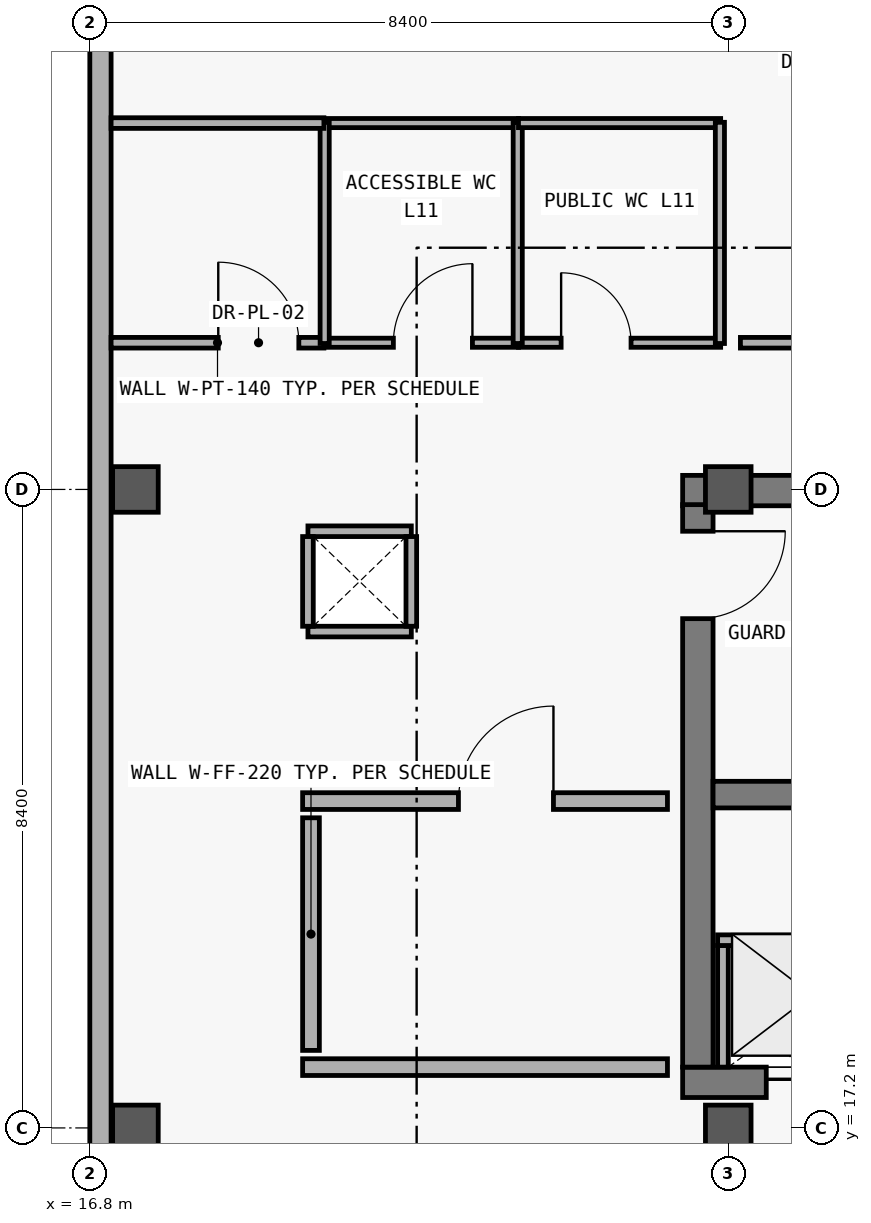
"""IFC4 building model, lengths in metres.
Left out: names, types, materials, properties, quantities, classifications, styles, units other than length and angle.
Written with IfcOpenShell. Run it as: python <this file> out.ifc"""

import sys

from ifc_helpers import new_model, si_unit, direction, frame, frame_2d, origin, origin_2d, place, context, subcontext, project, spatial, rectangle, extrude, element, fill, save


model = new_model("IFC4")
c1 = context("Model", 3, precision=1e-05, world=origin(), true_north=direction((0.0, 1.0)))
c2 = subcontext(c1, "Body", "Model", "MODEL_VIEW")
j1 = project(units=[si_unit("LENGTHUNIT", "METRE"), si_unit("PLANEANGLEUNIT", "RADIAN")], contexts=[c1])
p1 = place(None, origin())
s1 = spatial("IfcSite", under=j1, at=p1, CompositionType="ELEMENT")
p2 = place(p1, origin())
s2 = spatial("IfcBuilding", under=s1, at=p2, CompositionType="ELEMENT")
p3 = place(p2, frame((0.0, 0.0, 44.4)))
s3 = spatial("IfcBuildingStorey", under=s2, at=p3, CompositionType="ELEMENT", Elevation=44.4)
for number, where, z_axis, x_axis in (
    (1, (17.4, 17.2, 0.0), (0.0, 0.0, 1.0), (1.0, 0.0, 0.0)),
    (2, (17.4, 25.6, 0.0), (0.0, 0.0, 1.0), (1.0, 0.0, 0.0)),
    (3, (25.2, 17.2, 0.0), (0.0, 0.0, 1.0), (1.0, 0.0, 0.0)),
    (4, (25.2, 25.6, 0.0), (0.0, 0.0, 1.0), (1.0, 0.0, 0.0)),
):
    element("IfcColumn", number, at=place(p3, frame(where, z_axis=z_axis, x_axis=x_axis)), inside=s3, PredefinedType="COLUMN", context=c2, shape_type="SweptSolid", body=[
        extrude(rectangle(XDim=0.6, YDim=0.6, at=origin_2d()), origin(), (0.0, 0.0, 1.0), 4.2),
    ])
p4 = place(p3, frame((16.94, 8.8, 0.0), z_axis=(0.0, 0.0, 1.0), x_axis=(0.0, 1.0, 0.0)))
e5 = element("IfcWall", 5, at=p4, inside=s3, PredefinedType="SOLIDWALL", context=c2, shape_type="SweptSolid", body=[
    extrude(rectangle(XDim=25.2, YDim=0.28, at=frame_2d((12.6, 0.0))), origin(), (0.0, 0.0, 1.0), 3.96),
])
p5 = place(p4, frame((1.7, 0.0, 0.95)))
e6 = element("IfcOpeningElement", 6, at=p5, cuts=e5, PredefinedType="OPENING", context=c2, shape_type="SweptSolid", body=[
    extrude(rectangle(XDim=1.6, YDim=1.6, at=frame_2d((0.8, 0.8))), frame((0.0, 0.15, 0.0), z_axis=(0.0, -1.0, 0.0), x_axis=(1.0, 0.0, 0.0)), (0.0, 0.0, 1.0), 0.3),
])
p6 = place(p3, frame((24.6, 17.8, 0.0), z_axis=(0.0, 0.0, 1.0), x_axis=(1.0, 0.0, 0.0)))
e7 = element("IfcWall", 7, at=p6, inside=s3, PredefinedType="SHEAR", context=c2, shape_type="SweptSolid", body=[
    extrude(rectangle(XDim=9.2, YDim=0.4, at=frame_2d((4.6, 0.0))), origin(), (0.0, 0.0, 1.0), 3.96),
])
p7 = place(p6, frame((1.1, 0.0, 0.0)))
e8 = element("IfcOpeningElement", 8, at=p7, cuts=e7, PredefinedType="OPENING", context=c2, shape_type="SweptSolid", body=[
    extrude(rectangle(XDim=1.2, YDim=2.2, at=frame_2d((0.6, 1.1))), frame((0.0, 0.21, 0.0), z_axis=(0.0, -1.0, 0.0), x_axis=(1.0, 0.0, 0.0)), (0.0, 0.0, 1.0), 0.42),
])
p8 = place(p6, frame((3.5, 0.0, 0.0)))
e9 = element("IfcOpeningElement", 9, at=p8, cuts=e7, PredefinedType="OPENING", context=c2, shape_type="SweptSolid", body=[
    extrude(rectangle(XDim=1.1, YDim=2.2, at=frame_2d((0.55, 1.1))), frame((0.0, 0.21, 0.0), z_axis=(0.0, -1.0, 0.0), x_axis=(1.0, 0.0, 0.0)), (0.0, 0.0, 1.0), 0.42),
])
p9 = place(p6, frame((5.9, 0.0, 0.0)))
e10 = element("IfcOpeningElement", 10, at=p9, cuts=e7, PredefinedType="OPENING", context=c2, shape_type="SweptSolid", body=[
    extrude(rectangle(XDim=1.1, YDim=2.2, at=frame_2d((0.55, 1.1))), frame((0.0, 0.21, 0.0), z_axis=(0.0, -1.0, 0.0), x_axis=(1.0, 0.0, 0.0)), (0.0, 0.0, 1.0), 0.42),
])
p10 = place(p3, frame((33.8, 25.585, 0.0), z_axis=(0.0, 0.0, 1.0), x_axis=(-1.0, 0.0, 0.0)))
e11 = element("IfcWall", 11, at=p10, inside=s3, PredefinedType="SHEAR", context=c2, shape_type="SweptSolid", body=[
    extrude(rectangle(XDim=9.2, YDim=0.4, at=frame_2d((4.6, 0.0))), origin(), (0.0, 0.0, 1.0), 3.96),
])
p11 = place(p3, frame((24.8, 25.4, 0.0), z_axis=(0.0, 0.0, 1.0), x_axis=(0.0, -1.0, 0.0)))
e12 = element("IfcWall", 12, at=p11, inside=s3, PredefinedType="SHEAR", context=c2, shape_type="SweptSolid", body=[
    extrude(rectangle(XDim=7.4, YDim=0.4, at=frame_2d((3.7, 0.0))), origin(), (0.0, 0.0, 1.0), 3.96),
])
p12 = place(p11, frame((0.35, 0.0, 0.0)))
e13 = element("IfcOpeningElement", 13, at=p12, cuts=e12, PredefinedType="OPENING", context=c2, shape_type="SweptSolid", body=[
    extrude(rectangle(XDim=1.15, YDim=2.2, at=frame_2d((0.575, 1.1))), frame((0.0, 0.21, 0.0), z_axis=(0.0, -1.0, 0.0), x_axis=(1.0, 0.0, 0.0)), (0.0, 0.0, 1.0), 0.42),
])
p13 = place(p3, frame((25.0, 21.585, 0.0), z_axis=(0.0, 0.0, 1.0), x_axis=(1.0, 0.0, 0.0)))
e14 = element("IfcWall", 14, at=p13, inside=s3, PredefinedType="SHEAR", context=c2, shape_type="SweptSolid", body=[
    extrude(rectangle(XDim=8.4, YDim=0.35, at=frame_2d((4.2, 0.0))), origin(), (0.0, 0.0, 1.0), 3.96),
])
p14 = place(p3, frame((25.13, 18.0, 0.0), z_axis=(0.0, 0.0, 1.0), x_axis=(0.0, 1.0, 0.0)))
e15 = element("IfcWall", 15, at=p14, inside=s3, PredefinedType="PARTITIONING", context=c2, shape_type="SweptSolid", body=[
    extrude(rectangle(XDim=1.6, YDim=0.14, at=frame_2d((0.8, 0.0))), origin(), (0.0, 0.0, 1.0), 3.11),
])
p15 = place(p3, frame((25.06, 19.67, 0.0), z_axis=(0.0, 0.0, 1.0), x_axis=(1.0, 0.0, 0.0)))
e16 = element("IfcWall", 16, at=p15, inside=s3, PredefinedType="PARTITIONING", context=c2, shape_type="SweptSolid", body=[
    extrude(rectangle(XDim=7.18, YDim=0.14, at=frame_2d((3.59, 0.0))), origin(), (0.0, 0.0, 1.0), 3.11),
])
p16 = place(p3, frame((19.6, 18.0, 0.0), z_axis=(0.0, 0.0, 1.0), x_axis=(1.0, 0.0, 0.0)))
e17 = element("IfcWall", 17, at=p16, inside=s3, PredefinedType="SOLIDWALL", context=c2, shape_type="SweptSolid", body=[
    extrude(rectangle(XDim=4.8, YDim=0.22, at=frame_2d((2.4, 0.0))), origin(), (0.0, 0.0, 1.0), 3.11),
])
p17 = place(p3, frame((19.6, 21.5, 0.0), z_axis=(0.0, 0.0, 1.0), x_axis=(1.0, 0.0, 0.0)))
e18 = element("IfcWall", 18, at=p17, inside=s3, PredefinedType="SOLIDWALL", context=c2, shape_type="SweptSolid", body=[
    extrude(rectangle(XDim=4.8, YDim=0.22, at=frame_2d((2.4, 0.0))), origin(), (0.0, 0.0, 1.0), 3.11),
])
p18 = place(p17, frame((2.05, 0.0, 0.0)))
e19 = element("IfcOpeningElement", 19, at=p18, cuts=e18, PredefinedType="OPENING", context=c2, shape_type="SweptSolid", body=[
    extrude(rectangle(XDim=1.25, YDim=2.2, at=frame_2d((0.625, 1.1))), frame((0.0, 0.12, 0.0), z_axis=(0.0, -1.0, 0.0), x_axis=(1.0, 0.0, 0.0)), (0.0, 0.0, 1.0), 0.24),
])
p19 = place(p3, frame((19.71, 18.22, 0.0), z_axis=(0.0, 0.0, 1.0), x_axis=(0.0, 1.0, 0.0)))
e20 = element("IfcWall", 20, at=p19, inside=s3, PredefinedType="SOLIDWALL", context=c2, shape_type="SweptSolid", body=[
    extrude(rectangle(XDim=3.06, YDim=0.22, at=frame_2d((1.53, 0.0))), origin(), (0.0, 0.0, 1.0), 3.11),
])
p20 = place(p3, frame((19.88, 27.53, 0.0), z_axis=(0.0, 0.0, 1.0), x_axis=(1.0, 0.0, 0.0)))
e21 = element("IfcWall", 21, at=p20, inside=s3, PredefinedType="PARTITIONING", context=c2, shape_type="SweptSolid", body=[
    extrude(rectangle(XDim=2.56, YDim=0.12, at=frame_2d((1.28, 0.0))), origin(), (0.0, 0.0, 1.0), 3.06),
])
p21 = place(p20, frame((0.914, 0.0, 0.0)))
e22 = element("IfcOpeningElement", 22, at=p21, cuts=e21, PredefinedType="OPENING", context=c2, shape_type="SweptSolid", body=[
    extrude(rectangle(XDim=1.04, YDim=2.15, at=frame_2d((0.52, 1.075))), frame((0.0, 0.07, 0.0), z_axis=(0.0, -1.0, 0.0), x_axis=(1.0, 0.0, 0.0)), (0.0, 0.0, 1.0), 0.14),
])
p22 = place(p3, frame((22.44, 27.53, 0.0), z_axis=(0.0, 0.0, 1.0), x_axis=(1.0, 0.0, 0.0)))
e23 = element("IfcWall", 23, at=p22, inside=s3, PredefinedType="PARTITIONING", context=c2, shape_type="SweptSolid", body=[
    extrude(rectangle(XDim=2.66, YDim=0.12, at=frame_2d((1.33, 0.0))), origin(), (0.0, 0.0, 1.0), 3.06),
])
p23 = place(p22, frame((0.561, 0.0, 0.0)))
e24 = element("IfcOpeningElement", 24, at=p23, cuts=e23, PredefinedType="OPENING", context=c2, shape_type="SweptSolid", body=[
    extrude(rectangle(XDim=0.92, YDim=2.15, at=frame_2d((0.46, 1.075))), frame((0.0, 0.07, 0.0), z_axis=(0.0, -1.0, 0.0), x_axis=(1.0, 0.0, 0.0)), (0.0, 0.0, 1.0), 0.14),
])
p24 = place(p3, frame((17.08, 27.53, 0.0), z_axis=(0.0, 0.0, 1.0), x_axis=(1.0, 0.0, 0.0)))
e25 = element("IfcWall", 25, at=p24, inside=s3, PredefinedType="PARTITIONING", context=c2, shape_type="SweptSolid", body=[
    extrude(rectangle(XDim=2.8, YDim=0.14, at=frame_2d((1.4, 0.0))), origin(), (0.0, 0.0, 1.0), 3.06),
])
p25 = place(p24, frame((1.41, 0.0, 0.0)))
e26 = element("IfcOpeningElement", 26, at=p25, cuts=e25, PredefinedType="OPENING", context=c2, shape_type="SweptSolid", body=[
    extrude(rectangle(XDim=1.06, YDim=2.2, at=frame_2d((0.53, 1.1))), frame((0.0, 0.08, 0.0), z_axis=(0.0, -1.0, 0.0), x_axis=(1.0, 0.0, 0.0)), (0.0, 0.0, 1.0), 0.16),
])
p26 = place(p3, frame((25.36, 27.53, 0.0), z_axis=(0.0, 0.0, 1.0), x_axis=(1.0, 0.0, 0.0)))
e27 = element("IfcWall", 27, at=p26, inside=s3, PredefinedType="PARTITIONING", context=c2, shape_type="SweptSolid", body=[
    extrude(rectangle(XDim=3.71, YDim=0.14, at=frame_2d((1.855, 0.0))), origin(), (0.0, 0.0, 1.0), 3.06),
])
p27 = place(p26, frame((1.063, 0.0, 0.0)))
e28 = element("IfcOpeningElement", 28, at=p27, cuts=e27, PredefinedType="OPENING", context=c2, shape_type="SweptSolid", body=[
    extrude(rectangle(XDim=1.08, YDim=2.25, at=frame_2d((0.54, 1.125))), frame((0.0, 0.08, 0.0), z_axis=(0.0, -1.0, 0.0), x_axis=(1.0, 0.0, 0.0)), (0.0, 0.0, 1.0), 0.16),
])
p28 = place(p3, frame((19.88, 30.42, 0.0), z_axis=(0.0, 0.0, 1.0), x_axis=(1.0, 0.0, 0.0)))
e29 = element("IfcWall", 29, at=p28, inside=s3, PredefinedType="PARTITIONING", context=c2, shape_type="SweptSolid", body=[
    extrude(rectangle(XDim=2.56, YDim=0.12, at=frame_2d((1.28, 0.0))), origin(), (0.0, 0.0, 1.0), 3.06),
])
for number, where, z_axis, x_axis in (
    (30, (19.89, 27.52, 0.0), (0.0, 0.0, 1.0), (0.0, 1.0, 0.0)),
    (31, (22.43, 27.52, 0.0), (0.0, 0.0, 1.0), (0.0, 1.0, 0.0)),
):
    element("IfcWall", number, at=place(p3, frame(where, z_axis=z_axis, x_axis=x_axis)), inside=s3, PredefinedType="PARTITIONING", context=c2, shape_type="SweptSolid", body=[
        extrude(rectangle(XDim=2.91, YDim=0.12, at=frame_2d((1.455, 0.0))), origin(), (0.0, 0.0, 1.0), 3.06),
    ])
p29 = place(p3, frame((22.44, 30.42, 0.0), z_axis=(0.0, 0.0, 1.0), x_axis=(1.0, 0.0, 0.0)))
e32 = element("IfcWall", 32, at=p29, inside=s3, PredefinedType="PARTITIONING", context=c2, shape_type="SweptSolid", body=[
    extrude(rectangle(XDim=2.66, YDim=0.12, at=frame_2d((1.33, 0.0))), origin(), (0.0, 0.0, 1.0), 3.06),
])
p30 = place(p3, frame((25.09, 27.52, 0.0), z_axis=(0.0, 0.0, 1.0), x_axis=(0.0, 1.0, 0.0)))
e33 = element("IfcWall", 33, at=p30, inside=s3, PredefinedType="PARTITIONING", context=c2, shape_type="SweptSolid", body=[
    extrude(rectangle(XDim=2.91, YDim=0.12, at=frame_2d((1.455, 0.0))), origin(), (0.0, 0.0, 1.0), 3.06),
])
p31 = place(p3, frame((17.08, 30.42, 0.0), z_axis=(0.0, 0.0, 1.0), x_axis=(1.0, 0.0, 0.0)))
e34 = element("IfcWall", 34, at=p31, inside=s3, PredefinedType="PARTITIONING", context=c2, shape_type="SweptSolid", body=[
    extrude(rectangle(XDim=2.8, YDim=0.14, at=frame_2d((1.4, 0.0))), origin(), (0.0, 0.0, 1.0), 3.06),
])
for number, where, z_axis, x_axis in (
    (35, (19.67, 23.73, 0.0), (0.0, 0.0, 1.0), (1.0, 0.0, 0.0)),
    (36, (21.03, 25.05, 0.0), (0.0, 0.0, 1.0), (-1.0, 0.0, 0.0)),
):
    element("IfcWall", number, at=place(p3, frame(where, z_axis=z_axis, x_axis=x_axis)), inside=s3, PredefinedType="PARTITIONING", context=c2, shape_type="SweptSolid", body=[
        extrude(rectangle(XDim=1.36, YDim=0.14, at=frame_2d((0.68, 0.0))), origin(), (0.0, 0.0, 1.0), 3.08),
    ])
for number, where, z_axis, x_axis in (
    (37, (19.67, 24.98, 0.0), (0.0, 0.0, 1.0), (0.0, -1.0, 0.0)),
    (38, (21.03, 23.8, 0.0), (0.0, 0.0, 1.0), (0.0, 1.0, 0.0)),
):
    element("IfcWall", number, at=place(p3, frame(where, z_axis=z_axis, x_axis=x_axis)), inside=s3, PredefinedType="PARTITIONING", context=c2, shape_type="SweptSolid", body=[
        extrude(rectangle(XDim=1.18, YDim=0.14, at=frame_2d((0.59, 0.0))), origin(), (0.0, 0.0, 1.0), 3.08),
    ])
p32 = place(p12, origin())
e39 = element("IfcDoor", 39, at=p32, inside=s3, OperationType="SINGLE_SWING_LEFT", PredefinedType="DOOR", context=c2, shape_type="SweptSolid", body=[
    extrude(rectangle(XDim=1.15, YDim=2.2, at=frame_2d((0.575, 1.1))), frame((0.0, 0.025, 0.0), z_axis=(0.0, -1.0, 0.0), x_axis=(1.0, 0.0, 0.0)), (0.0, 0.0, 1.0), 0.05),
])
fill(e13, e39)
p33 = place(p7, origin())
e40 = element("IfcDoor", 40, at=p33, inside=s3, OperationType="DOUBLE_DOOR_SLIDING", PredefinedType="DOOR", context=c2, shape_type="SweptSolid", body=[
    extrude(rectangle(XDim=1.2, YDim=2.2, at=frame_2d((0.6, 1.1))), frame((0.0, 0.025, 0.0), z_axis=(0.0, -1.0, 0.0), x_axis=(1.0, 0.0, 0.0)), (0.0, 0.0, 1.0), 0.05),
])
fill(e8, e40)
p34 = place(p18, origin())
e41 = element("IfcDoor", 41, at=p34, inside=s3, OperationType="SINGLE_SWING_RIGHT", PredefinedType="DOOR", context=c2, shape_type="SweptSolid", body=[
    extrude(rectangle(XDim=1.25, YDim=2.2, at=frame_2d((0.625, 1.1))), frame((0.0, 0.025, 0.0), z_axis=(0.0, -1.0, 0.0), x_axis=(1.0, 0.0, 0.0)), (0.0, 0.0, 1.0), 0.05),
])
fill(e19, e41)
p35 = place(p21, origin())
e42 = element("IfcDoor", 42, at=p35, inside=s3, OperationType="SINGLE_SWING_RIGHT", PredefinedType="DOOR", context=c2, shape_type="SweptSolid", body=[
    extrude(rectangle(XDim=1.04, YDim=2.15, at=frame_2d((0.52, 1.075))), frame((0.0, 0.025, 0.0), z_axis=(0.0, -1.0, 0.0), x_axis=(1.0, 0.0, 0.0)), (0.0, 0.0, 1.0), 0.05),
])
fill(e22, e42)
p36 = place(p23, origin())
e43 = element("IfcDoor", 43, at=p36, inside=s3, OperationType="SINGLE_SWING_LEFT", PredefinedType="DOOR", context=c2, shape_type="SweptSolid", body=[
    extrude(rectangle(XDim=0.92, YDim=2.15, at=frame_2d((0.46, 1.075))), frame((0.0, 0.025, 0.0), z_axis=(0.0, -1.0, 0.0), x_axis=(1.0, 0.0, 0.0)), (0.0, 0.0, 1.0), 0.05),
])
fill(e24, e43)
p37 = place(p25, origin())
e44 = element("IfcDoor", 44, at=p37, inside=s3, OperationType="SINGLE_SWING_LEFT", PredefinedType="DOOR", context=c2, shape_type="SweptSolid", body=[
    extrude(rectangle(XDim=1.06, YDim=2.2, at=frame_2d((0.53, 1.1))), frame((0.0, 0.025, 0.0), z_axis=(0.0, -1.0, 0.0), x_axis=(1.0, 0.0, 0.0)), (0.0, 0.0, 1.0), 0.05),
])
fill(e26, e44)
save(model, sys.argv[1])
